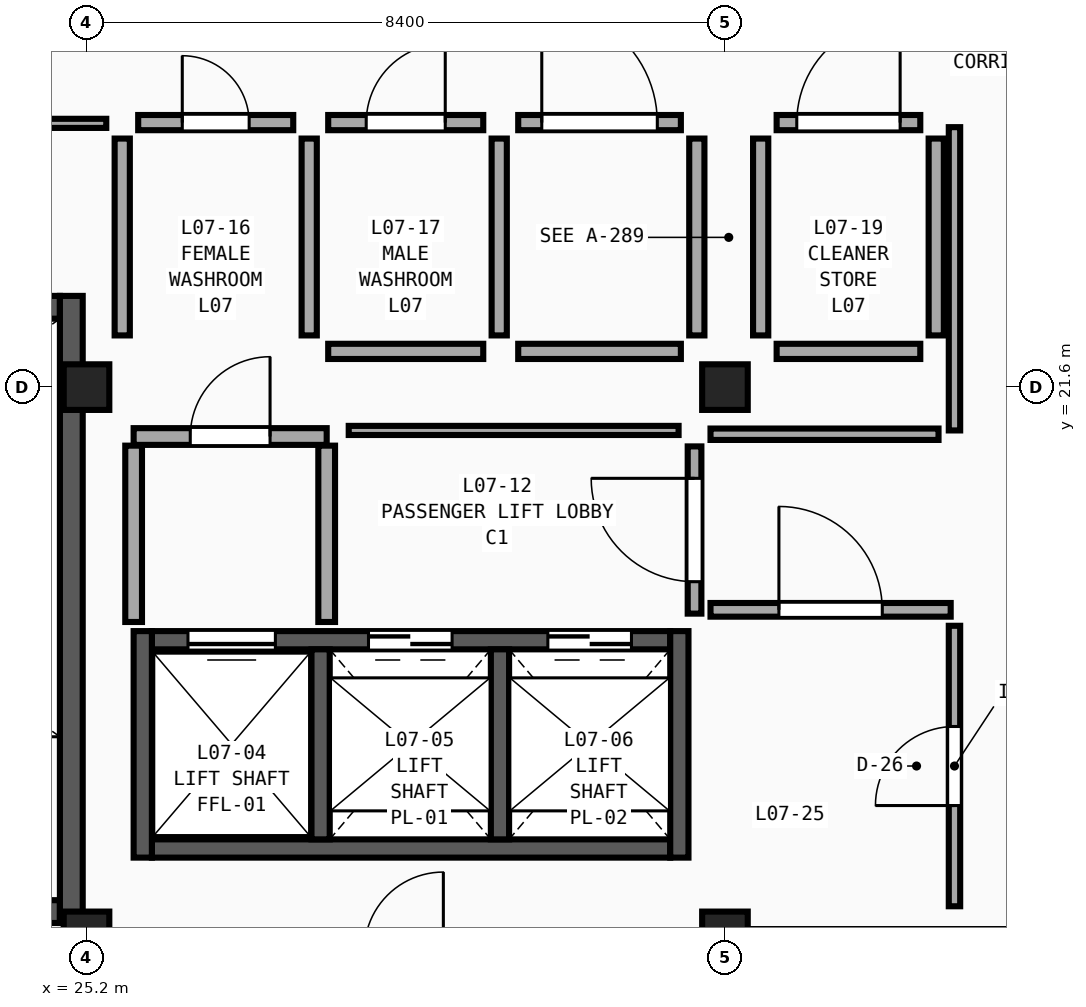
"""IFC4 building model, lengths in metres.
Left out: names, types, materials, properties, quantities, classifications, styles, units other than length and angle.
Written with IfcOpenShell. Run it as: python <this file> out.ifc"""

import sys

from ifc_helpers import new_model, si_unit, direction, frame, frame_2d, origin, origin_2d, place, context, subcontext, project, spatial, rectangle, extrude, element, fill, save


model = new_model("IFC4")
c1 = context("Model", 3, precision=1e-05, world=origin(), true_north=direction((0.0, 1.0)))
c2 = subcontext(c1, "Body", "Model", "MODEL_VIEW")
j1 = project(units=[si_unit("LENGTHUNIT", "METRE"), si_unit("PLANEANGLEUNIT", "RADIAN")], contexts=[c1])
p1 = place(None, origin())
s1 = spatial("IfcSite", under=j1, at=p1, CompositionType="ELEMENT")
p2 = place(p1, origin())
s2 = spatial("IfcBuilding", under=s1, at=p2, CompositionType="ELEMENT")
p3 = place(p2, frame((0.0, 0.0, 32.1)))
s3 = spatial("IfcBuildingStorey", under=s2, at=p3, CompositionType="ELEMENT", Elevation=32.1)
for number, where, z_axis, x_axis in (
    (1, (25.2, 14.4, 0.0), (0.0, 0.0, 1.0), (1.0, 0.0, 0.0)),
    (2, (25.2, 21.6, 0.0), (0.0, 0.0, 1.0), (1.0, 0.0, 0.0)),
    (3, (33.6, 14.4, 0.0), (0.0, 0.0, 1.0), (1.0, 0.0, 0.0)),
    (4, (33.6, 21.6, 0.0), (0.0, 0.0, 1.0), (1.0, 0.0, 0.0)),
):
    element("IfcColumn", number, at=place(p3, frame(where, z_axis=z_axis, x_axis=x_axis)), inside=s3, PredefinedType="COLUMN", context=c2, shape_type="SweptSolid", body=[
        extrude(rectangle(XDim=0.6, YDim=0.6, at=origin_2d()), origin(), (0.0, 0.0, 1.0), 4.5),
    ])
p4 = place(p3, frame((24.85, 14.7, 0.0), z_axis=(0.0, 0.0, 1.0), x_axis=(-1.0, 0.0, 0.0)))
e5 = element("IfcWall", 5, at=p4, inside=s3, PredefinedType="SHEAR", context=c2, shape_type="SweptSolid", body=[
    extrude(rectangle(XDim=7.7, YDim=0.3, at=frame_2d((3.85, 0.0))), origin(), (0.0, 0.0, 1.0), 4.5),
])
p5 = place(p4, frame((3.3, 0.0, 0.0)))
e6 = element("IfcOpeningElement", 6, at=p5, cuts=e5, PredefinedType="OPENING", context=c2, shape_type="SweptSolid", body=[
    extrude(rectangle(XDim=1.1, YDim=2.2, at=frame_2d((0.55, 1.1))), frame((0.0, 0.17, 0.0), z_axis=(0.0, -1.0, 0.0), x_axis=(1.0, 0.0, 0.0)), (0.0, 0.0, 1.0), 0.34),
])
p6 = place(p3, frame((17.15, 22.65, 0.0), z_axis=(0.0, 0.0, 1.0), x_axis=(1.0, 0.0, 0.0)))
e7 = element("IfcWall", 7, at=p6, inside=s3, PredefinedType="SHEAR", context=c2, shape_type="SweptSolid", body=[
    extrude(rectangle(XDim=7.7, YDim=0.3, at=frame_2d((3.85, 0.0))), origin(), (0.0, 0.0, 1.0), 4.5),
])
p7 = place(p3, frame((25.0, 14.55, 0.0), z_axis=(0.0, 0.0, 1.0), x_axis=(0.0, 1.0, 0.0)))
e8 = element("IfcWall", 8, at=p7, inside=s3, PredefinedType="SHEAR", context=c2, shape_type="SweptSolid", body=[
    extrude(rectangle(XDim=8.25, YDim=0.3, at=frame_2d((4.125, 0.0))), origin(), (0.0, 0.0, 1.0), 4.5),
])
p8 = place(p3, frame((32.88, 18.27, 0.0), z_axis=(0.0, 0.0, 1.0), x_axis=(-1.0, 0.0, 0.0)))
e9 = element("IfcWall", 9, at=p8, inside=s3, PredefinedType="SHEAR", context=c2, shape_type="SweptSolid", body=[
    extrude(rectangle(XDim=6.82, YDim=0.24, at=frame_2d((3.41, 0.0))), origin(), (0.0, 0.0, 1.0), 5.35),
])
p9 = place(p8, frame((5.195, 0.0, 0.0)))
e10 = element("IfcOpeningElement", 10, at=p9, cuts=e9, PredefinedType="OPENING", context=c2, shape_type="SweptSolid", body=[
    extrude(rectangle(XDim=1.15, YDim=2.25, at=frame_2d((0.575, 1.125))), frame((0.0, 0.14, 0.0), z_axis=(0.0, -1.0, 0.0), x_axis=(1.0, 0.0, 0.0)), (0.0, 0.0, 1.0), 0.28),
])
p10 = place(p8, frame((2.87, 0.0, 0.0)))
e11 = element("IfcOpeningElement", 11, at=p10, cuts=e9, PredefinedType="OPENING", context=c2, shape_type="SweptSolid", body=[
    extrude(rectangle(XDim=1.1, YDim=2.2, at=frame_2d((0.55, 1.1))), frame((0.0, 0.14, 0.0), z_axis=(0.0, -1.0, 0.0), x_axis=(1.0, 0.0, 0.0)), (0.0, 0.0, 1.0), 0.28),
])
p11 = place(p8, frame((0.51, 0.0, 0.0)))
e12 = element("IfcOpeningElement", 12, at=p11, cuts=e9, PredefinedType="OPENING", context=c2, shape_type="SweptSolid", body=[
    extrude(rectangle(XDim=1.1, YDim=2.2, at=frame_2d((0.55, 1.1))), frame((0.0, 0.14, 0.0), z_axis=(0.0, -1.0, 0.0), x_axis=(1.0, 0.0, 0.0)), (0.0, 0.0, 1.0), 0.28),
])
p12 = place(p3, frame((26.06, 15.53, 0.0), z_axis=(0.0, 0.0, 1.0), x_axis=(1.0, 0.0, 0.0)))
e13 = element("IfcWall", 13, at=p12, inside=s3, PredefinedType="SHEAR", context=c2, shape_type="SweptSolid", body=[
    extrude(rectangle(XDim=6.82, YDim=0.24, at=frame_2d((3.41, 0.0))), origin(), (0.0, 0.0, 1.0), 5.35),
])
for number, where, z_axis, x_axis in (
    (14, (25.94, 18.39, 0.0), (0.0, 0.0, 1.0), (0.0, -1.0, 0.0)),
    (15, (33.0, 15.41, 0.0), (0.0, 0.0, 1.0), (0.0, 1.0, 0.0)),
):
    element("IfcWall", number, at=place(p3, frame(where, z_axis=z_axis, x_axis=x_axis)), inside=s3, PredefinedType="SHEAR", context=c2, shape_type="SweptSolid", body=[
        extrude(rectangle(XDim=2.98, YDim=0.24, at=frame_2d((1.49, 0.0))), origin(), (0.0, 0.0, 1.0), 5.35),
    ])
for number, where, z_axis, x_axis in (
    (16, (28.28, 15.65, 0.0), (0.0, 0.0, 1.0), (0.0, 1.0, 0.0)),
    (17, (30.64, 15.65, 0.0), (0.0, 0.0, 1.0), (0.0, 1.0, 0.0)),
):
    element("IfcWall", number, at=place(p3, frame(where, z_axis=z_axis, x_axis=x_axis)), inside=s3, PredefinedType="SHEAR", context=c2, shape_type="SweptSolid", body=[
        extrude(rectangle(XDim=2.5, YDim=0.24, at=frame_2d((1.25, 0.0))), origin(), (0.0, 0.0, 1.0), 5.35),
    ])
p13 = place(p3, frame((25.82, 20.95, 0.0), z_axis=(0.0, 0.0, 1.0), x_axis=(1.0, 0.0, 0.0)))
e18 = element("IfcWall", 18, at=p13, inside=s3, PredefinedType="SOLIDWALL", context=c2, shape_type="SweptSolid", body=[
    extrude(rectangle(XDim=2.54, YDim=0.22, at=frame_2d((1.27, 0.0))), origin(), (0.0, 0.0, 1.0), 3.79),
])
p14 = place(p13, frame((0.745, 0.0, 0.0)))
e19 = element("IfcOpeningElement", 19, at=p14, cuts=e18, PredefinedType="OPENING", context=c2, shape_type="SweptSolid", body=[
    extrude(rectangle(XDim=1.05, YDim=2.15, at=frame_2d((0.525, 1.075))), frame((0.0, 0.13, 0.0), z_axis=(0.0, -1.0, 0.0), x_axis=(1.0, 0.0, 0.0)), (0.0, 0.0, 1.0), 0.26),
])
p15 = place(p3, frame((25.82, 18.51, 0.0), z_axis=(0.0, 0.0, 1.0), x_axis=(0.0, 1.0, 0.0)))
e20 = element("IfcWall", 20, at=p15, inside=s3, PredefinedType="SOLIDWALL", context=c2, shape_type="SweptSolid", body=[
    extrude(rectangle(XDim=2.32, YDim=0.22, at=frame_2d((1.16, 0.0))), origin(), (0.0, 0.0, 1.0), 3.79),
])
p16 = place(p3, frame((28.36, 18.51, 0.0), z_axis=(0.0, 0.0, 1.0), x_axis=(0.0, 1.0, 0.0)))
e21 = element("IfcWall", 21, at=p16, inside=s3, PredefinedType="SOLIDWALL", context=c2, shape_type="SweptSolid", body=[
    extrude(rectangle(XDim=2.32, YDim=0.22, at=frame_2d((1.16, 0.0))), origin(), (0.0, 0.0, 1.0), 4.24),
])
p17 = place(p3, frame((28.65, 21.03, 0.0), z_axis=(0.0, 0.0, 1.0), x_axis=(1.0, 0.0, 0.0)))
e22 = element("IfcWall", 22, at=p17, inside=s3, PredefinedType="PARTITIONING", context=c2, shape_type="SweptSolid", body=[
    extrude(rectangle(XDim=4.34, YDim=0.12, at=frame_2d((2.17, 0.0))), origin(), (0.0, 0.0, 1.0), 3.79),
])
p18 = place(p3, frame((36.62, 21.03, 0.0), z_axis=(0.0, 0.0, 1.0), x_axis=(0.0, 1.0, 0.0)))
e23 = element("IfcWall", 23, at=p18, inside=s3, PredefinedType="PARTITIONING", context=c2, shape_type="SweptSolid", body=[
    extrude(rectangle(XDim=3.99, YDim=0.15, at=frame_2d((1.995, 0.0))), origin(), (0.0, 0.0, 1.0), 4.24),
])
p19 = place(p3, frame((36.62, 14.77, 0.0), z_axis=(0.0, 0.0, 1.0), x_axis=(0.0, 1.0, 0.0)))
e24 = element("IfcWall", 24, at=p19, inside=s3, PredefinedType="PARTITIONING", context=c2, shape_type="SweptSolid", body=[
    extrude(rectangle(XDim=3.69, YDim=0.15, at=frame_2d((1.845, 0.0))), origin(), (0.0, 0.0, 1.0), 4.24),
])
p20 = place(p19, frame((1.325, 0.0, 0.0)))
e25 = element("IfcOpeningElement", 25, at=p20, cuts=e24, PredefinedType="OPENING", context=c2, shape_type="SweptSolid", body=[
    extrude(rectangle(XDim=1.04, YDim=2.37, at=frame_2d((0.52, 1.185))), frame((0.0, 0.095, 0.0), z_axis=(0.0, -1.0, 0.0), x_axis=(1.0, 0.0, 0.0)), (0.0, 0.0, 1.0), 0.19),
])
p21 = place(p3, frame((22.24, 25.07, 0.0), z_axis=(0.0, 0.0, 1.0), x_axis=(1.0, 0.0, 0.0)))
e26 = element("IfcWall", 26, at=p21, inside=s3, PredefinedType="PARTITIONING", context=c2, shape_type="SweptSolid", body=[
    extrude(rectangle(XDim=3.22, YDim=0.12, at=frame_2d((1.61, 0.0))), origin(), (0.0, 0.0, 1.0), 4.24),
])
p22 = place(p21, frame((1.01, 0.0, 0.0)))
e27 = element("IfcOpeningElement", 27, at=p22, cuts=e26, PredefinedType="OPENING", context=c2, shape_type="SweptSolid", body=[
    extrude(rectangle(XDim=1.2, YDim=2.37, at=frame_2d((0.6, 1.185))), frame((0.0, 0.08, 0.0), z_axis=(0.0, -1.0, 0.0), x_axis=(1.0, 0.0, 0.0)), (0.0, 0.0, 1.0), 0.16),
])
p23 = place(p3, frame((33.41, 18.67, 0.0), z_axis=(0.0, 0.0, 1.0), x_axis=(1.0, 0.0, 0.0)))
e28 = element("IfcWall", 28, at=p23, inside=s3, PredefinedType="PARTITIONING", context=c2, shape_type="SweptSolid", body=[
    extrude(rectangle(XDim=3.16, YDim=0.18, at=frame_2d((1.58, 0.0))), origin(), (0.0, 0.0, 1.0), 4.24),
])
p24 = place(p23, frame((0.9, 0.0, 0.0)))
e29 = element("IfcOpeningElement", 29, at=p24, cuts=e28, PredefinedType="OPENING", context=c2, shape_type="SweptSolid", body=[
    extrude(rectangle(XDim=1.36, YDim=2.37, at=frame_2d((0.68, 1.185))), frame((0.0, 0.11, 0.0), z_axis=(0.0, -1.0, 0.0), x_axis=(1.0, 0.0, 0.0)), (0.0, 0.0, 1.0), 0.22),
])
p25 = place(p3, frame((33.41, 20.98, 0.0), z_axis=(0.0, 0.0, 1.0), x_axis=(1.0, 0.0, 0.0)))
e30 = element("IfcWall", 30, at=p25, inside=s3, PredefinedType="PARTITIONING", context=c2, shape_type="SweptSolid", body=[
    extrude(rectangle(XDim=3.0, YDim=0.15, at=frame_2d((1.5, 0.0))), origin(), (0.0, 0.0, 1.0), 3.79),
])
p26 = place(p3, frame((33.2, 18.62, 0.0), z_axis=(0.0, 0.0, 1.0), x_axis=(0.0, 1.0, 0.0)))
e31 = element("IfcWall", 31, at=p26, inside=s3, PredefinedType="PARTITIONING", context=c2, shape_type="SweptSolid", body=[
    extrude(rectangle(XDim=2.2, YDim=0.18, at=frame_2d((1.1, 0.0))), origin(), (0.0, 0.0, 1.0), 3.79),
])
p27 = place(p26, frame((0.42, 0.0, 0.0)))
e32 = element("IfcOpeningElement", 32, at=p27, cuts=e31, PredefinedType="OPENING", context=c2, shape_type="SweptSolid", body=[
    extrude(rectangle(XDim=1.36, YDim=2.45, at=frame_2d((0.68, 1.225))), frame((0.0, 0.11, 0.0), z_axis=(0.0, -1.0, 0.0), x_axis=(1.0, 0.0, 0.0)), (0.0, 0.0, 1.0), 0.22),
])
p28 = place(p3, frame((30.88, 25.08, 0.0), z_axis=(0.0, 0.0, 1.0), x_axis=(1.0, 0.0, 0.0)))
e33 = element("IfcWall", 33, at=p28, inside=s3, PredefinedType="PLUMBINGWALL", context=c2, shape_type="SweptSolid", body=[
    extrude(rectangle(XDim=2.14, YDim=0.2, at=frame_2d((1.07, 0.0))), origin(), (0.0, 0.0, 1.0), 4.24),
])
p29 = place(p28, frame((0.31, 0.0, 0.0)))
e34 = element("IfcOpeningElement", 34, at=p29, cuts=e33, PredefinedType="OPENING", context=c2, shape_type="SweptSolid", body=[
    extrude(rectangle(XDim=1.52, YDim=2.45, at=frame_2d((0.76, 1.225))), frame((0.0, 0.12, 0.0), z_axis=(0.0, -1.0, 0.0), x_axis=(1.0, 0.0, 0.0)), (0.0, 0.0, 1.0), 0.24),
])
p30 = place(p3, frame((25.88, 25.08, 0.0), z_axis=(0.0, 0.0, 1.0), x_axis=(1.0, 0.0, 0.0)))
e35 = element("IfcWall", 35, at=p30, inside=s3, PredefinedType="PLUMBINGWALL", context=c2, shape_type="SweptSolid", body=[
    extrude(rectangle(XDim=2.04, YDim=0.2, at=frame_2d((1.02, 0.0))), origin(), (0.0, 0.0, 1.0), 4.24),
])
p31 = place(p30, frame((0.58, 0.0, 0.0)))
e36 = element("IfcOpeningElement", 36, at=p31, cuts=e35, PredefinedType="OPENING", context=c2, shape_type="SweptSolid", body=[
    extrude(rectangle(XDim=0.88, YDim=2.05, at=frame_2d((0.44, 1.025))), frame((0.0, 0.12, 0.0), z_axis=(0.0, -1.0, 0.0), x_axis=(1.0, 0.0, 0.0)), (0.0, 0.0, 1.0), 0.24),
])
p32 = place(p3, frame((28.38, 25.08, 0.0), z_axis=(0.0, 0.0, 1.0), x_axis=(1.0, 0.0, 0.0)))
e37 = element("IfcWall", 37, at=p32, inside=s3, PredefinedType="PLUMBINGWALL", context=c2, shape_type="SweptSolid", body=[
    extrude(rectangle(XDim=2.04, YDim=0.2, at=frame_2d((1.02, 0.0))), origin(), (0.0, 0.0, 1.0), 4.24),
])
p33 = place(p32, frame((0.5, 0.0, 0.0)))
e38 = element("IfcOpeningElement", 38, at=p33, cuts=e37, PredefinedType="OPENING", context=c2, shape_type="SweptSolid", body=[
    extrude(rectangle(XDim=1.04, YDim=2.05, at=frame_2d((0.52, 1.025))), frame((0.0, 0.12, 0.0), z_axis=(0.0, -1.0, 0.0), x_axis=(1.0, 0.0, 0.0)), (0.0, 0.0, 1.0), 0.24),
])
p34 = place(p3, frame((34.28, 25.08, 0.0), z_axis=(0.0, 0.0, 1.0), x_axis=(1.0, 0.0, 0.0)))
e39 = element("IfcWall", 39, at=p34, inside=s3, PredefinedType="PLUMBINGWALL", context=c2, shape_type="SweptSolid", body=[
    extrude(rectangle(XDim=1.89, YDim=0.2, at=frame_2d((0.945, 0.0))), origin(), (0.0, 0.0, 1.0), 4.24),
])
p35 = place(p34, frame((0.265, 0.0, 0.0)))
e40 = element("IfcOpeningElement", 40, at=p35, cuts=e39, PredefinedType="OPENING", context=c2, shape_type="SweptSolid", body=[
    extrude(rectangle(XDim=1.36, YDim=2.05, at=frame_2d((0.68, 1.025))), frame((0.0, 0.12, 0.0), z_axis=(0.0, -1.0, 0.0), x_axis=(1.0, 0.0, 0.0)), (0.0, 0.0, 1.0), 0.24),
])
p36 = place(p3, frame((28.13, 22.28, 0.0), z_axis=(0.0, 0.0, 1.0), x_axis=(0.0, 1.0, 0.0)))
e41 = element("IfcWall", 41, at=p36, inside=s3, PredefinedType="PLUMBINGWALL", context=c2, shape_type="SweptSolid", body=[
    extrude(rectangle(XDim=2.59, YDim=0.2, at=frame_2d((1.295, 0.0))), origin(), (0.0, 0.0, 1.0), 4.24),
])
p37 = place(p3, frame((25.67, 22.28, 0.0), z_axis=(0.0, 0.0, 1.0), x_axis=(0.0, 1.0, 0.0)))
e42 = element("IfcWall", 42, at=p37, inside=s3, PredefinedType="PLUMBINGWALL", context=c2, shape_type="SweptSolid", body=[
    extrude(rectangle(XDim=2.59, YDim=0.2, at=frame_2d((1.295, 0.0))), origin(), (0.0, 0.0, 1.0), 3.79),
])
p38 = place(p3, frame((30.63, 22.28, 0.0), z_axis=(0.0, 0.0, 1.0), x_axis=(0.0, 1.0, 0.0)))
e43 = element("IfcWall", 43, at=p38, inside=s3, PredefinedType="PLUMBINGWALL", context=c2, shape_type="SweptSolid", body=[
    extrude(rectangle(XDim=2.59, YDim=0.2, at=frame_2d((1.295, 0.0))), origin(), (0.0, 0.0, 1.0), 4.24),
])
p39 = place(p3, frame((33.23, 22.28, 0.0), z_axis=(0.0, 0.0, 1.0), x_axis=(0.0, 1.0, 0.0)))
e44 = element("IfcWall", 44, at=p39, inside=s3, PredefinedType="PLUMBINGWALL", context=c2, shape_type="SweptSolid", body=[
    extrude(rectangle(XDim=2.59, YDim=0.2, at=frame_2d((1.295, 0.0))), origin(), (0.0, 0.0, 1.0), 3.79),
])
p40 = place(p3, frame((36.38, 22.28, 0.0), z_axis=(0.0, 0.0, 1.0), x_axis=(0.0, 1.0, 0.0)))
e45 = element("IfcWall", 45, at=p40, inside=s3, PredefinedType="PLUMBINGWALL", context=c2, shape_type="SweptSolid", body=[
    extrude(rectangle(XDim=2.59, YDim=0.2, at=frame_2d((1.295, 0.0))), origin(), (0.0, 0.0, 1.0), 4.24),
])
p41 = place(p3, frame((34.07, 22.28, 0.0), z_axis=(0.0, 0.0, 1.0), x_axis=(0.0, 1.0, 0.0)))
e46 = element("IfcWall", 46, at=p41, inside=s3, PredefinedType="PLUMBINGWALL", context=c2, shape_type="SweptSolid", body=[
    extrude(rectangle(XDim=2.59, YDim=0.2, at=frame_2d((1.295, 0.0))), origin(), (0.0, 0.0, 1.0), 3.79),
])
p42 = place(p3, frame((30.88, 22.07, 0.0), z_axis=(0.0, 0.0, 1.0), x_axis=(1.0, 0.0, 0.0)))
e47 = element("IfcWall", 47, at=p42, inside=s3, PredefinedType="PLUMBINGWALL", context=c2, shape_type="SweptSolid", body=[
    extrude(rectangle(XDim=2.14, YDim=0.2, at=frame_2d((1.07, 0.0))), origin(), (0.0, 0.0, 1.0), 3.79),
])
p43 = place(p3, frame((28.38, 22.07, 0.0), z_axis=(0.0, 0.0, 1.0), x_axis=(1.0, 0.0, 0.0)))
e48 = element("IfcWall", 48, at=p43, inside=s3, PredefinedType="PLUMBINGWALL", context=c2, shape_type="SweptSolid", body=[
    extrude(rectangle(XDim=2.04, YDim=0.2, at=frame_2d((1.02, 0.0))), origin(), (0.0, 0.0, 1.0), 3.79),
])
p44 = place(p3, frame((34.28, 22.07, 0.0), z_axis=(0.0, 0.0, 1.0), x_axis=(1.0, 0.0, 0.0)))
e49 = element("IfcWall", 49, at=p44, inside=s3, PredefinedType="PLUMBINGWALL", context=c2, shape_type="SweptSolid", body=[
    extrude(rectangle(XDim=1.89, YDim=0.2, at=frame_2d((0.945, 0.0))), origin(), (0.0, 0.0, 1.0), 3.79),
])
p45 = place(p9, origin())
e50 = element("IfcDoor", 50, at=p45, inside=s3, OperationType="SLIDING_TO_LEFT", PredefinedType="DOOR", context=c2, shape_type="SweptSolid", body=[
    extrude(rectangle(XDim=1.15, YDim=2.25, at=frame_2d((0.575, 1.125))), frame((0.0, 0.025, 0.0), z_axis=(0.0, -1.0, 0.0), x_axis=(1.0, 0.0, 0.0)), (0.0, 0.0, 1.0), 0.05),
])
fill(e10, e50)
p46 = place(p10, origin())
e51 = element("IfcDoor", 51, at=p46, inside=s3, OperationType="DOUBLE_DOOR_SLIDING", PredefinedType="DOOR", context=c2, shape_type="SweptSolid", body=[
    extrude(rectangle(XDim=1.1, YDim=2.2, at=frame_2d((0.55, 1.1))), frame((0.0, 0.025, 0.0), z_axis=(0.0, -1.0, 0.0), x_axis=(1.0, 0.0, 0.0)), (0.0, 0.0, 1.0), 0.05),
])
fill(e11, e51)
p47 = place(p11, origin())
e52 = element("IfcDoor", 52, at=p47, inside=s3, OperationType="DOUBLE_DOOR_SLIDING", PredefinedType="DOOR", context=c2, shape_type="SweptSolid", body=[
    extrude(rectangle(XDim=1.1, YDim=2.2, at=frame_2d((0.55, 1.1))), frame((0.0, 0.025, 0.0), z_axis=(0.0, -1.0, 0.0), x_axis=(1.0, 0.0, 0.0)), (0.0, 0.0, 1.0), 0.05),
])
fill(e12, e52)
p48 = place(p14, origin())
e53 = element("IfcDoor", 53, at=p48, inside=s3, OperationType="SINGLE_SWING_RIGHT", PredefinedType="DOOR", context=c2, shape_type="SweptSolid", body=[
    extrude(rectangle(XDim=1.05, YDim=2.15, at=frame_2d((0.525, 1.075))), frame((0.0, 0.025, 0.0), z_axis=(0.0, -1.0, 0.0), x_axis=(1.0, 0.0, 0.0)), (0.0, 0.0, 1.0), 0.05),
])
fill(e19, e53)
p49 = place(p20, origin())
e54 = element("IfcDoor", 54, at=p49, inside=s3, OperationType="SINGLE_SWING_LEFT", PredefinedType="DOOR", context=c2, shape_type="SweptSolid", body=[
    extrude(rectangle(XDim=1.04, YDim=2.37, at=frame_2d((0.52, 1.185))), frame((0.0, 0.025, 0.0), z_axis=(0.0, -1.0, 0.0), x_axis=(1.0, 0.0, 0.0)), (0.0, 0.0, 1.0), 0.05),
])
fill(e25, e54)
p50 = place(p24, origin())
e55 = element("IfcDoor", 55, at=p50, inside=s3, OperationType="SINGLE_SWING_LEFT", PredefinedType="DOOR", context=c2, shape_type="SweptSolid", body=[
    extrude(rectangle(XDim=1.36, YDim=2.37, at=frame_2d((0.68, 1.185))), frame((0.0, 0.025, 0.0), z_axis=(0.0, -1.0, 0.0), x_axis=(1.0, 0.0, 0.0)), (0.0, 0.0, 1.0), 0.05),
])
fill(e29, e55)
p51 = place(p27, origin())
e56 = element("IfcDoor", 56, at=p51, inside=s3, OperationType="SINGLE_SWING_RIGHT", PredefinedType="DOOR", context=c2, shape_type="SweptSolid", body=[
    extrude(rectangle(XDim=1.36, YDim=2.45, at=frame_2d((0.68, 1.225))), frame((0.0, 0.025, 0.0), z_axis=(0.0, -1.0, 0.0), x_axis=(1.0, 0.0, 0.0)), (0.0, 0.0, 1.0), 0.05),
])
fill(e32, e56)
p52 = place(p29, origin())
e57 = element("IfcDoor", 57, at=p52, inside=s3, OperationType="SINGLE_SWING_LEFT", PredefinedType="DOOR", context=c2, shape_type="SweptSolid", body=[
    extrude(rectangle(XDim=1.52, YDim=2.45, at=frame_2d((0.76, 1.225))), frame((0.0, 0.025, 0.0), z_axis=(0.0, -1.0, 0.0), x_axis=(1.0, 0.0, 0.0)), (0.0, 0.0, 1.0), 0.05),
])
fill(e34, e57)
p53 = place(p31, origin())
e58 = element("IfcDoor", 58, at=p53, inside=s3, OperationType="SINGLE_SWING_LEFT", PredefinedType="DOOR", context=c2, shape_type="SweptSolid", body=[
    extrude(rectangle(XDim=0.88, YDim=2.05, at=frame_2d((0.44, 1.025))), frame((0.0, 0.025, 0.0), z_axis=(0.0, -1.0, 0.0), x_axis=(1.0, 0.0, 0.0)), (0.0, 0.0, 1.0), 0.05),
])
fill(e36, e58)
p54 = place(p33, origin())
e59 = element("IfcDoor", 59, at=p54, inside=s3, OperationType="SINGLE_SWING_RIGHT", PredefinedType="DOOR", context=c2, shape_type="SweptSolid", body=[
    extrude(rectangle(XDim=1.04, YDim=2.05, at=frame_2d((0.52, 1.025))), frame((0.0, 0.025, 0.0), z_axis=(0.0, -1.0, 0.0), x_axis=(1.0, 0.0, 0.0)), (0.0, 0.0, 1.0), 0.05),
])
fill(e38, e59)
p55 = place(p35, origin())
e60 = element("IfcDoor", 60, at=p55, inside=s3, OperationType="SINGLE_SWING_RIGHT", PredefinedType="DOOR", context=c2, shape_type="SweptSolid", body=[
    extrude(rectangle(XDim=1.36, YDim=2.05, at=frame_2d((0.68, 1.025))), frame((0.0, 0.025, 0.0), z_axis=(0.0, -1.0, 0.0), x_axis=(1.0, 0.0, 0.0)), (0.0, 0.0, 1.0), 0.05),
])
fill(e40, e60)
save(model, sys.argv[1])
